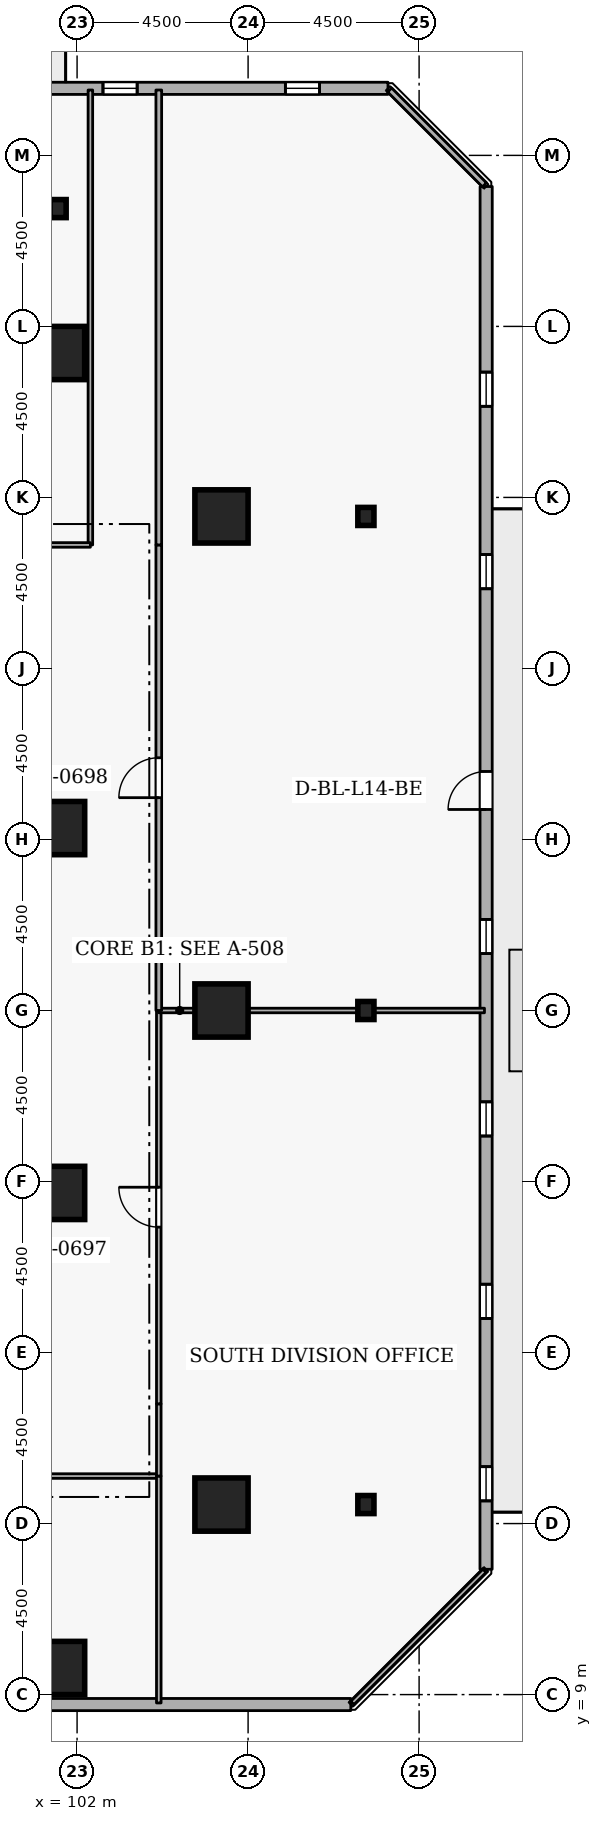
"""IFC4 building model, lengths in metres.
Left out: names, types, materials, properties, quantities, classifications, styles, units other than length and angle.
Written with IfcOpenShell. Run it as: python <this file> out.ifc"""

import sys

from ifc_helpers import new_model, si_unit, direction, frame, frame_2d, origin, origin_2d, place, context, subcontext, project, spatial, rectangle, i_section, extrude, element, fill, save


model = new_model("IFC4")
c1 = context("Model", 3, precision=1e-05, world=origin(), true_north=direction((0.0, 1.0)))
c2 = subcontext(c1, "Body", "Model", "MODEL_VIEW")
j1 = project(units=[si_unit("LENGTHUNIT", "METRE"), si_unit("PLANEANGLEUNIT", "RADIAN")], contexts=[c1])
p1 = place(None, origin())
s1 = spatial("IfcSite", under=j1, at=p1, CompositionType="ELEMENT")
p2 = place(p1, origin())
s2 = spatial("IfcBuilding", under=s1, at=p2, CompositionType="ELEMENT")
p3 = place(p2, frame((0.0, 0.0, 57.3)))
s3 = spatial("IfcBuildingStorey", under=s2, at=p3, CompositionType="ELEMENT", Elevation=57.3)
for number, where, z_axis, x_axis in (
    (1, (105.8, 14.0, 0.0), (0.0, 0.0, 1.0), (1.0, 0.0, 0.0)),
    (2, (105.8, 27.0, 0.0), (0.0, 0.0, 1.0), (1.0, 0.0, 0.0)),
    (3, (105.8, 40.0, 0.0), (0.0, 0.0, 1.0), (1.0, 0.0, 0.0)),
    (4, (101.5, 44.3, 0.0), (0.0, 0.0, 1.0), (1.0, 0.0, 0.0)),
    (5, (101.5, 9.7, 0.0), (0.0, 0.0, 1.0), (1.0, 0.0, 0.0)),
    (6, (101.5, 22.2, 0.0), (0.0, 0.0, 1.0), (1.0, 0.0, 0.0)),
    (7, (101.5, 31.8, 0.0), (0.0, 0.0, 1.0), (1.0, 0.0, 0.0)),
):
    element("IfcColumn", number, at=place(p3, frame(where, z_axis=z_axis, x_axis=x_axis)), inside=s3, PredefinedType="COLUMN", context=c2, shape_type="SweptSolid", body=[
        extrude(rectangle(XDim=1.4, YDim=1.4, at=origin_2d()), origin(), (0.0, 0.0, 1.0), 3.6),
    ])
for number, where, z_axis, x_axis in (
    (8, (109.6, 14.0, 0.0), (0.0, 0.0, 1.0), (1.0, 0.0, 0.0)),
    (9, (109.6, 27.0, 0.0), (0.0, 0.0, 1.0), (1.0, 0.0, 0.0)),
    (10, (109.6, 40.0, 0.0), (0.0, 0.0, 1.0), (1.0, 0.0, 0.0)),
    (11, (101.5, 48.1, 0.0), (0.0, 0.0, 1.0), (1.0, 0.0, 0.0)),
):
    element("IfcColumn", number, at=place(p3, frame(where, z_axis=z_axis, x_axis=x_axis)), inside=s3, PredefinedType="COLUMN", context=c2, shape_type="SweptSolid", body=[
        extrude(i_section(OverallWidth=0.424, OverallDepth=0.475, WebThickness=0.048, FlangeThickness=0.077, FilletRadius=0.015, at=origin_2d()), origin(), (0.0, 0.0, 1.0), 3.6),
    ])
p4 = place(p3, frame((72.819, 8.735, 0.0), z_axis=(0.0, 0.0, 1.0), x_axis=(0.999999996195, 8.7231344e-05, 0.0)))
e12 = element("IfcWall", 12, at=p4, inside=s3, PredefinedType="STANDARD", context=c2, shape_type="SweptSolid", body=[
    extrude(rectangle(XDim=36.384, YDim=0.32, at=frame_2d((18.192, 0.0))), origin(), (0.0, 0.0, 1.0), 2.7),
])
p5 = place(p4, frame((6.6, 0.0, 0.72)))
e13 = element("IfcOpeningElement", 13, at=p5, cuts=e12, PredefinedType="OPENING", context=c2, shape_type="SweptSolid", body=[
    extrude(rectangle(XDim=0.9, YDim=1.75, at=frame_2d((0.45, 0.875))), frame((0.0, 0.17, 0.0), z_axis=(0.0, -1.0, 0.0), x_axis=(1.0, 0.0, 0.0)), (0.0, 0.0, 1.0), 0.34),
])
p6 = place(p4, frame((11.4, 0.0, 0.72)))
e14 = element("IfcOpeningElement", 14, at=p6, cuts=e12, PredefinedType="OPENING", context=c2, shape_type="SweptSolid", body=[
    extrude(rectangle(XDim=0.9, YDim=1.75, at=frame_2d((0.45, 0.875))), frame((0.0, 0.17, 0.0), z_axis=(0.0, -1.0, 0.0), x_axis=(1.0, 0.0, 0.0)), (0.0, 0.0, 1.0), 0.34),
])
p7 = place(p4, frame((21.0, 0.0, 0.72)))
e15 = element("IfcOpeningElement", 15, at=p7, cuts=e12, PredefinedType="OPENING", context=c2, shape_type="SweptSolid", body=[
    extrude(rectangle(XDim=0.9, YDim=1.75, at=frame_2d((0.45, 0.875))), frame((0.0, 0.17, 0.0), z_axis=(0.0, -1.0, 0.0), x_axis=(1.0, 0.0, 0.0)), (0.0, 0.0, 1.0), 0.34),
])
p8 = place(p4, frame((25.8, 0.0, 0.72)))
e16 = element("IfcOpeningElement", 16, at=p8, cuts=e12, PredefinedType="OPENING", context=c2, shape_type="SweptSolid", body=[
    extrude(rectangle(XDim=0.9, YDim=1.75, at=frame_2d((0.45, 0.875))), frame((0.0, 0.17, 0.0), z_axis=(0.0, -1.0, 0.0), x_axis=(1.0, 0.0, 0.0)), (0.0, 0.0, 1.0), 0.34),
])
p9 = place(p3, frame((112.762, 12.297, 0.0), z_axis=(0.0, 0.0, 1.0), x_axis=(8.7231344e-05, 0.999999996195, 0.0)))
e17 = element("IfcWall", 17, at=p9, inside=s3, PredefinedType="STANDARD", context=c2, shape_type="SweptSolid", body=[
    extrude(rectangle(XDim=36.384, YDim=0.32, at=frame_2d((18.192, 0.0))), origin(), (0.0, 0.0, 1.0), 2.7),
])
p10 = place(p9, frame((19.992, 0.0, 0.0)))
e18 = element("IfcOpeningElement", 18, at=p10, cuts=e17, PredefinedType="OPENING", context=c2, shape_type="SweptSolid", body=[
    extrude(rectangle(XDim=1.0, YDim=2.08, at=frame_2d((0.5, 1.04))), frame((0.0, 0.17, 0.0), z_axis=(0.0, -1.0, 0.0), x_axis=(1.0, 0.0, 0.0)), (0.0, 0.0, 1.0), 0.34),
])
p11 = place(p9, frame((1.8, 0.0, 0.72)))
e19 = element("IfcOpeningElement", 19, at=p11, cuts=e17, PredefinedType="OPENING", context=c2, shape_type="SweptSolid", body=[
    extrude(rectangle(XDim=0.9, YDim=1.75, at=frame_2d((0.45, 0.875))), frame((0.0, 0.17, 0.0), z_axis=(0.0, -1.0, 0.0), x_axis=(1.0, 0.0, 0.0)), (0.0, 0.0, 1.0), 0.34),
])
p12 = place(p9, frame((6.6, 0.0, 0.72)))
e20 = element("IfcOpeningElement", 20, at=p12, cuts=e17, PredefinedType="OPENING", context=c2, shape_type="SweptSolid", body=[
    extrude(rectangle(XDim=0.9, YDim=1.75, at=frame_2d((0.45, 0.875))), frame((0.0, 0.17, 0.0), z_axis=(0.0, -1.0, 0.0), x_axis=(1.0, 0.0, 0.0)), (0.0, 0.0, 1.0), 0.34),
])
p13 = place(p9, frame((11.4, 0.0, 0.72)))
e21 = element("IfcOpeningElement", 21, at=p13, cuts=e17, PredefinedType="OPENING", context=c2, shape_type="SweptSolid", body=[
    extrude(rectangle(XDim=0.9, YDim=1.75, at=frame_2d((0.45, 0.875))), frame((0.0, 0.17, 0.0), z_axis=(0.0, -1.0, 0.0), x_axis=(1.0, 0.0, 0.0)), (0.0, 0.0, 1.0), 0.34),
])
p14 = place(p9, frame((16.2, 0.0, 0.72)))
e22 = element("IfcOpeningElement", 22, at=p14, cuts=e17, PredefinedType="OPENING", context=c2, shape_type="SweptSolid", body=[
    extrude(rectangle(XDim=0.9, YDim=1.75, at=frame_2d((0.45, 0.875))), frame((0.0, 0.17, 0.0), z_axis=(0.0, -1.0, 0.0), x_axis=(1.0, 0.0, 0.0)), (0.0, 0.0, 1.0), 0.34),
])
p15 = place(p9, frame((25.8, 0.0, 0.72)))
e23 = element("IfcOpeningElement", 23, at=p15, cuts=e17, PredefinedType="OPENING", context=c2, shape_type="SweptSolid", body=[
    extrude(rectangle(XDim=0.9, YDim=1.75, at=frame_2d((0.45, 0.875))), frame((0.0, 0.17, 0.0), z_axis=(0.0, -1.0, 0.0), x_axis=(1.0, 0.0, 0.0)), (0.0, 0.0, 1.0), 0.34),
])
p16 = place(p9, frame((30.6, 0.0, 0.72)))
e24 = element("IfcOpeningElement", 24, at=p16, cuts=e17, PredefinedType="OPENING", context=c2, shape_type="SweptSolid", body=[
    extrude(rectangle(XDim=0.9, YDim=1.75, at=frame_2d((0.45, 0.875))), frame((0.0, 0.17, 0.0), z_axis=(0.0, -1.0, 0.0), x_axis=(1.0, 0.0, 0.0)), (0.0, 0.0, 1.0), 0.34),
])
p17 = place(p3, frame((110.181, 51.265, 0.0), z_axis=(0.0, 0.0, 1.0), x_axis=(-0.999999996195, -8.7231344e-05, 0.0)))
e25 = element("IfcWall", 25, at=p17, inside=s3, PredefinedType="STANDARD", context=c2, shape_type="SweptSolid", body=[
    extrude(rectangle(XDim=36.384, YDim=0.32, at=frame_2d((18.192, 0.0))), origin(), (0.0, 0.0, 1.0), 2.7),
])
p18 = place(p17, frame((19.992, 0.0, 0.0)))
e26 = element("IfcOpeningElement", 26, at=p18, cuts=e25, PredefinedType="OPENING", context=c2, shape_type="SweptSolid", body=[
    extrude(rectangle(XDim=1.0, YDim=2.08, at=frame_2d((0.5, 1.04))), frame((0.0, 0.17, 0.0), z_axis=(0.0, -1.0, 0.0), x_axis=(1.0, 0.0, 0.0)), (0.0, 0.0, 1.0), 0.34),
])
p19 = place(p17, frame((1.8, 0.0, 0.72)))
e27 = element("IfcOpeningElement", 27, at=p19, cuts=e25, PredefinedType="OPENING", context=c2, shape_type="SweptSolid", body=[
    extrude(rectangle(XDim=0.9, YDim=1.75, at=frame_2d((0.45, 0.875))), frame((0.0, 0.17, 0.0), z_axis=(0.0, -1.0, 0.0), x_axis=(1.0, 0.0, 0.0)), (0.0, 0.0, 1.0), 0.34),
])
p20 = place(p17, frame((6.6, 0.0, 0.72)))
e28 = element("IfcOpeningElement", 28, at=p20, cuts=e25, PredefinedType="OPENING", context=c2, shape_type="SweptSolid", body=[
    extrude(rectangle(XDim=0.9, YDim=1.75, at=frame_2d((0.45, 0.875))), frame((0.0, 0.17, 0.0), z_axis=(0.0, -1.0, 0.0), x_axis=(1.0, 0.0, 0.0)), (0.0, 0.0, 1.0), 0.34),
])
p21 = place(p17, frame((11.4, 0.0, 0.72)))
e29 = element("IfcOpeningElement", 29, at=p21, cuts=e25, PredefinedType="OPENING", context=c2, shape_type="SweptSolid", body=[
    extrude(rectangle(XDim=0.9, YDim=1.75, at=frame_2d((0.45, 0.875))), frame((0.0, 0.17, 0.0), z_axis=(0.0, -1.0, 0.0), x_axis=(1.0, 0.0, 0.0)), (0.0, 0.0, 1.0), 0.34),
])
p22 = place(p17, frame((16.2, 0.0, 0.72)))
e30 = element("IfcOpeningElement", 30, at=p22, cuts=e25, PredefinedType="OPENING", context=c2, shape_type="SweptSolid", body=[
    extrude(rectangle(XDim=0.9, YDim=1.75, at=frame_2d((0.45, 0.875))), frame((0.0, 0.17, 0.0), z_axis=(0.0, -1.0, 0.0), x_axis=(1.0, 0.0, 0.0)), (0.0, 0.0, 1.0), 0.34),
])
p23 = place(p17, frame((25.8, 0.0, 0.72)))
e31 = element("IfcOpeningElement", 31, at=p23, cuts=e25, PredefinedType="OPENING", context=c2, shape_type="SweptSolid", body=[
    extrude(rectangle(XDim=0.9, YDim=1.75, at=frame_2d((0.45, 0.875))), frame((0.0, 0.17, 0.0), z_axis=(0.0, -1.0, 0.0), x_axis=(1.0, 0.0, 0.0)), (0.0, 0.0, 1.0), 0.34),
])
p24 = place(p17, frame((30.6, 0.0, 0.72)))
e32 = element("IfcOpeningElement", 32, at=p24, cuts=e25, PredefinedType="OPENING", context=c2, shape_type="SweptSolid", body=[
    extrude(rectangle(XDim=0.9, YDim=1.75, at=frame_2d((0.45, 0.875))), frame((0.0, 0.17, 0.0), z_axis=(0.0, -1.0, 0.0), x_axis=(1.0, 0.0, 0.0)), (0.0, 0.0, 1.0), 0.34),
])
p25 = place(p3, frame((94.8, 14.75, 0.0), z_axis=(0.0, 0.0, 1.0), x_axis=(1.0, 0.0, 0.0)))
e33 = element("IfcWall", 33, at=p25, inside=s3, PredefinedType="PARTITIONING", context=c2, shape_type="SweptSolid", body=[
    extrude(rectangle(XDim=9.35, YDim=0.12, at=frame_2d((4.675, 0.0))), origin(), (0.0, 0.0, 1.0), 3.34),
])
p26 = place(p25, frame((4.15, 0.0, 0.0)))
e34 = element("IfcOpeningElement", 34, at=p26, cuts=e33, PredefinedType="OPENING", context=c2, shape_type="SweptSolid", body=[
    extrude(rectangle(XDim=1.05, YDim=2.1, at=frame_2d((0.525, 1.05))), frame((0.0, 0.07, 0.0), z_axis=(0.0, -1.0, 0.0), x_axis=(1.0, 0.0, 0.0)), (0.0, 0.0, 1.0), 0.14),
])
p27 = place(p3, frame((104.15, 14.75, 0.0), z_axis=(0.0, 0.0, 1.0), x_axis=(0.0, -1.0, 0.0)))
e35 = element("IfcWall", 35, at=p27, inside=s3, PredefinedType="PARTITIONING", context=c2, shape_type="SweptSolid", body=[
    extrude(rectangle(XDim=5.97, YDim=0.12, at=frame_2d((2.985, 0.0))), origin(), (0.0, 0.0, 1.0), 3.34),
])
p28 = place(p3, frame((102.35, 51.22, 0.0), z_axis=(0.0, 0.0, 1.0), x_axis=(0.0, -1.0, 0.0)))
e36 = element("IfcWall", 36, at=p28, inside=s3, PredefinedType="PARTITIONING", context=c2, shape_type="SweptSolid", body=[
    extrude(rectangle(XDim=11.97, YDim=0.12, at=frame_2d((5.985, 0.0))), origin(), (0.0, 0.0, 1.0), 3.34),
])
p29 = place(p3, frame((102.35, 39.25, 0.0), z_axis=(0.0, 0.0, 1.0), x_axis=(-1.0, 0.0, 0.0)))
e37 = element("IfcWall", 37, at=p29, inside=s3, PredefinedType="PARTITIONING", context=c2, shape_type="SweptSolid", body=[
    extrude(rectangle(XDim=1.862, YDim=0.12, at=frame_2d((0.931, 0.0))), origin(), (0.0, 0.0, 1.0), 3.34),
])
p30 = place(p3, frame((104.15, 14.75, 0.0), z_axis=(0.0, 0.0, 1.0), x_axis=(0.0, 1.0, 0.0)))
e38 = element("IfcWall", 38, at=p30, inside=s3, PredefinedType="PARTITIONING", context=c2, shape_type="SweptSolid", body=[
    extrude(rectangle(XDim=1.9, YDim=0.12, at=frame_2d((0.95, 0.0))), origin(), (0.0, 0.0, 1.0), 3.34),
])
p31 = place(p3, frame((104.15, 16.65, 0.0), z_axis=(0.0, 0.0, 1.0), x_axis=(0.0, 1.0, 0.0)))
e39 = element("IfcWall", 39, at=p31, inside=s3, PredefinedType="PARTITIONING", context=c2, shape_type="SweptSolid", body=[
    extrude(rectangle(XDim=10.35, YDim=0.12, at=frame_2d((5.175, 0.0))), origin(), (0.0, 0.0, 1.0), 3.34),
])
p32 = place(p31, frame((4.65, 0.0, 0.0)))
e40 = element("IfcOpeningElement", 40, at=p32, cuts=e39, PredefinedType="OPENING", context=c2, shape_type="SweptSolid", body=[
    extrude(rectangle(XDim=1.05, YDim=2.1, at=frame_2d((0.525, 1.05))), frame((0.0, 0.07, 0.0), z_axis=(0.0, -1.0, 0.0), x_axis=(1.0, 0.0, 0.0)), (0.0, 0.0, 1.0), 0.14),
])
p33 = place(p3, frame((104.15, 27.0, 0.0), z_axis=(0.0, 0.0, 1.0), x_axis=(1.0, 0.0, 0.0)))
e41 = element("IfcWall", 41, at=p33, inside=s3, PredefinedType="PARTITIONING", context=c2, shape_type="SweptSolid", body=[
    extrude(rectangle(XDim=8.57, YDim=0.12, at=frame_2d((4.285, 0.0))), origin(), (0.0, 0.0, 1.0), 2.932),
])
p34 = place(p3, frame((112.72, 12.257, 0.0), z_axis=(0.0, 0.0, 1.0), x_axis=(-0.707106781187, -0.707106781187, 0.0)))
e42 = element("IfcWall", 42, at=p34, inside=s3, PredefinedType="PARTITIONING", context=c2, shape_type="SweptSolid", body=[
    extrude(rectangle(XDim=4.917, YDim=0.12, at=frame_2d((2.458, 0.0))), origin(), (0.0, 0.0, 1.0), 3.34),
])
p35 = place(p3, frame((104.15, 27.0, 0.0), z_axis=(0.0, 0.0, 1.0), x_axis=(0.0, 1.0, 0.0)))
e43 = element("IfcWall", 43, at=p35, inside=s3, PredefinedType="PARTITIONING", context=c2, shape_type="SweptSolid", body=[
    extrude(rectangle(XDim=12.25, YDim=0.15, at=frame_2d((6.125, 0.0))), origin(), (0.0, 0.0, 1.0), 3.34),
])
p36 = place(p35, frame((5.6, 0.0, 0.0)))
e44 = element("IfcOpeningElement", 44, at=p36, cuts=e43, PredefinedType="OPENING", context=c2, shape_type="SweptSolid", body=[
    extrude(rectangle(XDim=1.05, YDim=2.1, at=frame_2d((0.525, 1.05))), frame((0.0, 0.085, 0.0), z_axis=(0.0, -1.0, 0.0), x_axis=(1.0, 0.0, 0.0)), (0.0, 0.0, 1.0), 0.17),
])
p37 = place(p3, frame((104.15, 39.25, 0.0), z_axis=(0.0, 0.0, 1.0), x_axis=(0.0, 1.0, 0.0)))
e45 = element("IfcWall", 45, at=p37, inside=s3, PredefinedType="PARTITIONING", context=c2, shape_type="SweptSolid", body=[
    extrude(rectangle(XDim=11.97, YDim=0.15, at=frame_2d((5.985, 0.0))), origin(), (0.0, 0.0, 1.0), 3.34),
])
p38 = place(p3, frame((110.225, 51.22, 0.0), z_axis=(0.0, 0.0, 1.0), x_axis=(0.707106781187, -0.707106781187, 0.0)))
e46 = element("IfcWall", 46, at=p38, inside=s3, PredefinedType="PARTITIONING", context=c2, shape_type="SweptSolid", body=[
    extrude(rectangle(XDim=3.528, YDim=0.15, at=frame_2d((1.764, 0.0))), origin(), (0.0, 0.0, 1.0), 3.34),
])
p39 = place(p10, origin())
e47 = element("IfcDoor", 47, at=p39, inside=s3, OperationType="SINGLE_SWING_LEFT", PredefinedType="DOOR", context=c2, shape_type="SweptSolid", body=[
    extrude(rectangle(XDim=1.0, YDim=2.08, at=frame_2d((0.5, 1.04))), frame((0.0, 0.025, 0.0), z_axis=(0.0, -1.0, 0.0), x_axis=(1.0, 0.0, 0.0)), (0.0, 0.0, 1.0), 0.05),
])
fill(e18, e47)
p40 = place(p11, origin())
e48 = element("IfcWindow", 48, at=p40, inside=s3, PartitioningType="SINGLE_PANEL", PredefinedType="WINDOW", context=c2, shape_type="SweptSolid", body=[
    extrude(rectangle(XDim=0.9, YDim=1.75, at=frame_2d((0.45, 0.875))), frame((0.0, 0.03, 0.0), z_axis=(0.0, -1.0, 0.0), x_axis=(1.0, 0.0, 0.0)), (0.0, 0.0, 1.0), 0.06),
])
fill(e19, e48)
p41 = place(p12, origin())
e49 = element("IfcWindow", 49, at=p41, inside=s3, PartitioningType="SINGLE_PANEL", PredefinedType="WINDOW", context=c2, shape_type="SweptSolid", body=[
    extrude(rectangle(XDim=0.9, YDim=1.75, at=frame_2d((0.45, 0.875))), frame((0.0, 0.03, 0.0), z_axis=(0.0, -1.0, 0.0), x_axis=(1.0, 0.0, 0.0)), (0.0, 0.0, 1.0), 0.06),
])
fill(e20, e49)
p42 = place(p13, origin())
e50 = element("IfcWindow", 50, at=p42, inside=s3, PartitioningType="SINGLE_PANEL", PredefinedType="WINDOW", context=c2, shape_type="SweptSolid", body=[
    extrude(rectangle(XDim=0.9, YDim=1.75, at=frame_2d((0.45, 0.875))), frame((0.0, 0.03, 0.0), z_axis=(0.0, -1.0, 0.0), x_axis=(1.0, 0.0, 0.0)), (0.0, 0.0, 1.0), 0.06),
])
fill(e21, e50)
p43 = place(p14, origin())
e51 = element("IfcWindow", 51, at=p43, inside=s3, PartitioningType="SINGLE_PANEL", PredefinedType="WINDOW", context=c2, shape_type="SweptSolid", body=[
    extrude(rectangle(XDim=0.9, YDim=1.75, at=frame_2d((0.45, 0.875))), frame((0.0, 0.03, 0.0), z_axis=(0.0, -1.0, 0.0), x_axis=(1.0, 0.0, 0.0)), (0.0, 0.0, 1.0), 0.06),
])
fill(e22, e51)
p44 = place(p15, origin())
e52 = element("IfcWindow", 52, at=p44, inside=s3, PartitioningType="SINGLE_PANEL", PredefinedType="WINDOW", context=c2, shape_type="SweptSolid", body=[
    extrude(rectangle(XDim=0.9, YDim=1.75, at=frame_2d((0.45, 0.875))), frame((0.0, 0.03, 0.0), z_axis=(0.0, -1.0, 0.0), x_axis=(1.0, 0.0, 0.0)), (0.0, 0.0, 1.0), 0.06),
])
fill(e23, e52)
p45 = place(p16, origin())
e53 = element("IfcWindow", 53, at=p45, inside=s3, PartitioningType="SINGLE_PANEL", PredefinedType="WINDOW", context=c2, shape_type="SweptSolid", body=[
    extrude(rectangle(XDim=0.9, YDim=1.75, at=frame_2d((0.45, 0.875))), frame((0.0, 0.03, 0.0), z_axis=(0.0, -1.0, 0.0), x_axis=(1.0, 0.0, 0.0)), (0.0, 0.0, 1.0), 0.06),
])
fill(e24, e53)
p46 = place(p19, origin())
e54 = element("IfcWindow", 54, at=p46, inside=s3, PartitioningType="SINGLE_PANEL", PredefinedType="WINDOW", context=c2, shape_type="SweptSolid", body=[
    extrude(rectangle(XDim=0.9, YDim=1.75, at=frame_2d((0.45, 0.875))), frame((0.0, 0.03, 0.0), z_axis=(0.0, -1.0, 0.0), x_axis=(1.0, 0.0, 0.0)), (0.0, 0.0, 1.0), 0.06),
])
fill(e27, e54)
p47 = place(p20, origin())
e55 = element("IfcWindow", 55, at=p47, inside=s3, PartitioningType="SINGLE_PANEL", PredefinedType="WINDOW", context=c2, shape_type="SweptSolid", body=[
    extrude(rectangle(XDim=0.9, YDim=1.75, at=frame_2d((0.45, 0.875))), frame((0.0, 0.03, 0.0), z_axis=(0.0, -1.0, 0.0), x_axis=(1.0, 0.0, 0.0)), (0.0, 0.0, 1.0), 0.06),
])
fill(e28, e55)
p48 = place(p32, origin())
e56 = element("IfcDoor", 56, at=p48, inside=s3, OperationType="SINGLE_SWING_RIGHT", PredefinedType="DOOR", context=c2, shape_type="SweptSolid", body=[
    extrude(rectangle(XDim=1.05, YDim=2.1, at=frame_2d((0.525, 1.05))), frame((0.0, 0.025, 0.0), z_axis=(0.0, -1.0, 0.0), x_axis=(1.0, 0.0, 0.0)), (0.0, 0.0, 1.0), 0.05),
])
fill(e40, e56)
p49 = place(p36, origin())
e57 = element("IfcDoor", 57, at=p49, inside=s3, OperationType="SINGLE_SWING_LEFT", PredefinedType="DOOR", context=c2, shape_type="SweptSolid", body=[
    extrude(rectangle(XDim=1.05, YDim=2.1, at=frame_2d((0.525, 1.05))), frame((0.0, 0.025, 0.0), z_axis=(0.0, -1.0, 0.0), x_axis=(1.0, 0.0, 0.0)), (0.0, 0.0, 1.0), 0.05),
])
fill(e44, e57)
save(model, sys.argv[1])
